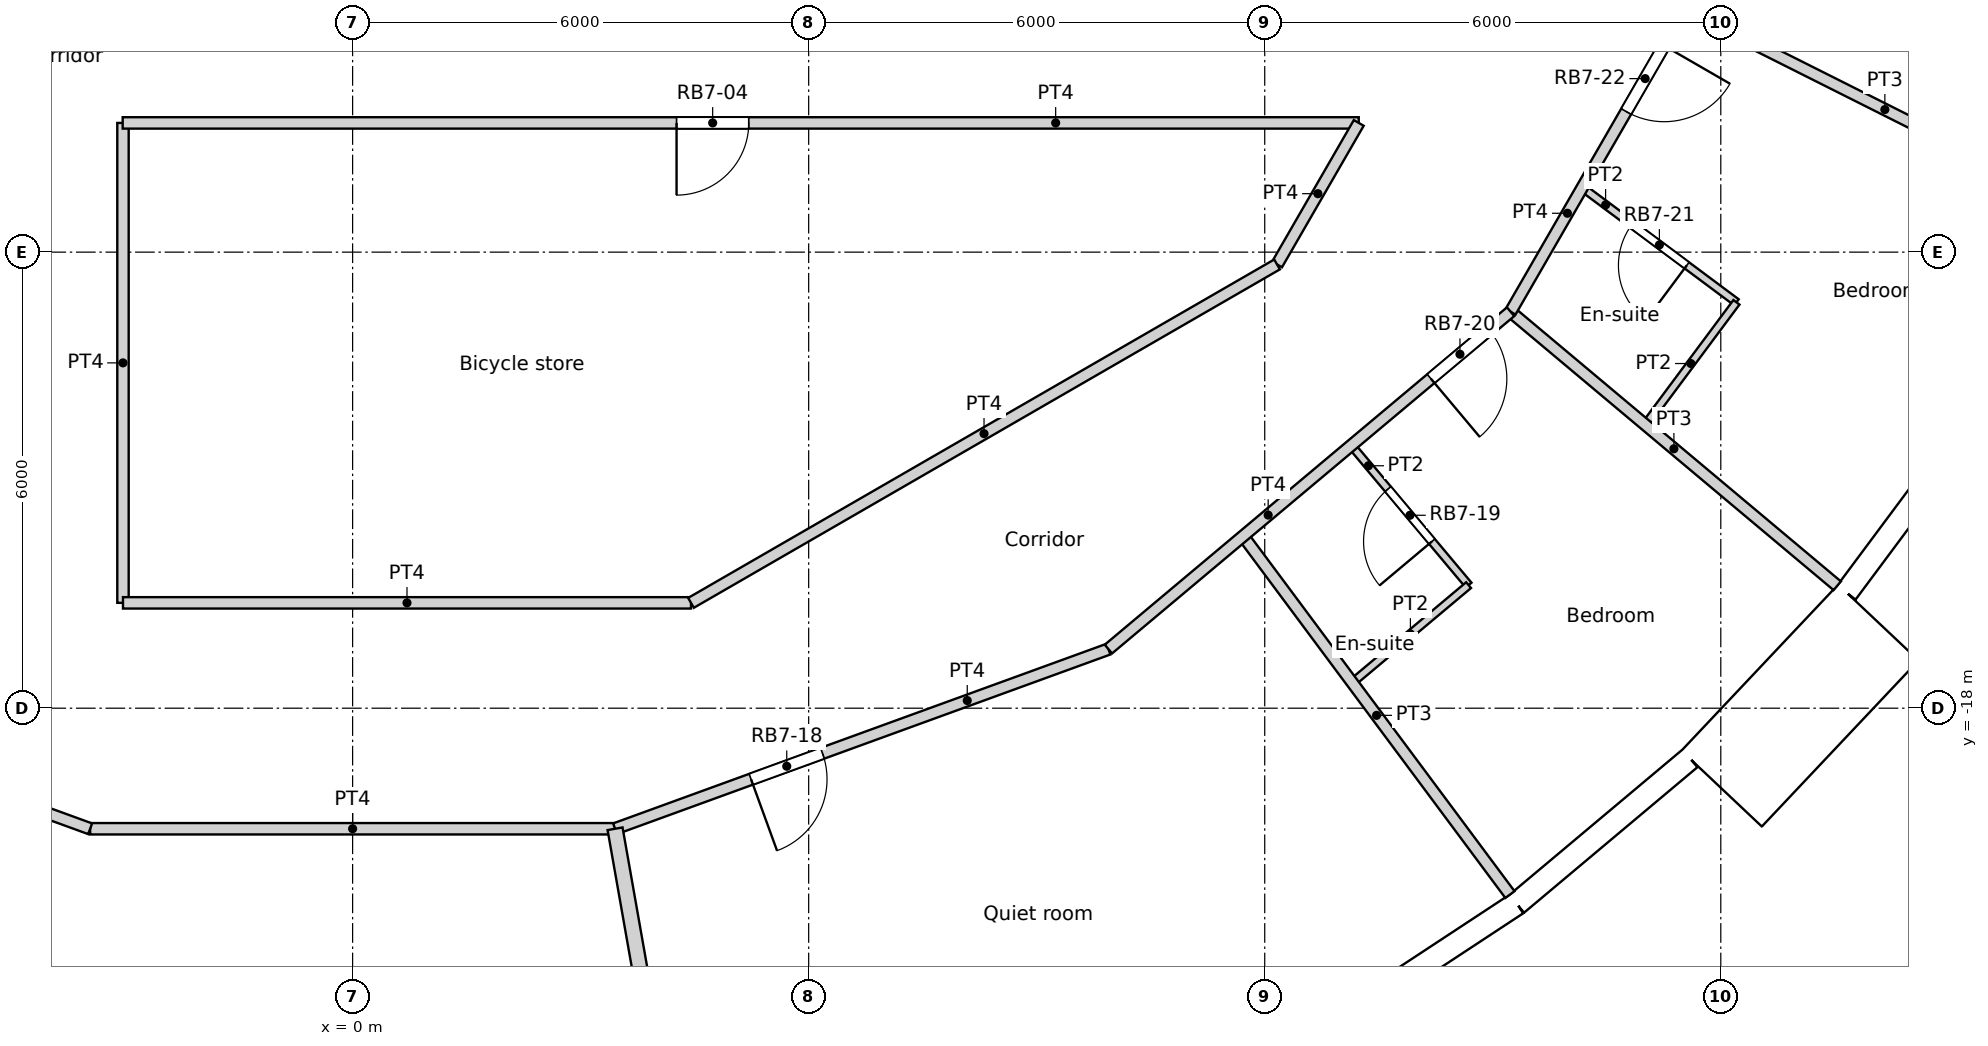
"""IFC4 building model, lengths in metres.
Left out: names, types, materials, properties, quantities, classifications, styles, units other than length and angle.
Written with IfcOpenShell. Run it as: python <this file> out.ifc"""

import sys

from ifc_helpers import new_model, si_unit, direction, frame, frame_2d, origin, origin_2d, place, context, subcontext, project, spatial, rectangle, circle, extrude, element, fill, save


model = new_model("IFC4")
c1 = context("Model", 3, precision=1e-05, world=origin(), true_north=direction((0.0, 1.0)))
c2 = subcontext(c1, "Body", "Model", "MODEL_VIEW")
j1 = project(units=[si_unit("LENGTHUNIT", "METRE"), si_unit("PLANEANGLEUNIT", "RADIAN")], contexts=[c1])
p1 = place(None, origin())
s1 = spatial("IfcSite", under=j1, at=p1, CompositionType="ELEMENT")
p2 = place(p1, origin())
s2 = spatial("IfcBuilding", under=s1, at=p2, CompositionType="ELEMENT")
p3 = place(p2, frame((0.0, 0.0, 190.8)))
s3 = spatial("IfcBuildingStorey", under=s2, at=p3, CompositionType="ELEMENT", Elevation=190.8)
for number, where, z_axis, x_axis in (
    (1, (14.659, -19.69, 0.0), (0.0, 0.0, 1.0), (1.0, 0.0, 0.0)),
    (2, (18.805, -15.779, 0.0), (0.0, 0.0, 1.0), (1.0, 0.0, 0.0)),
):
    element("IfcColumn", number, at=place(p3, frame(where, z_axis=z_axis, x_axis=x_axis)), inside=s3, PredefinedType="COLUMN", context=c2, shape_type="SweptSolid", body=[
        extrude(circle(Radius=0.6, at=origin_2d()), origin(), (0.0, 0.0, 1.0), 3.6),
    ])
for number, where, z_axis, x_axis in (
    (3, (-4.188, -18.35, 0.0), (0.0, 0.0, 1.0), (1.0, 0.0, 0.0)),
    (4, (1.406, -18.77, 0.0), (0.0, 0.0, 1.0), (1.0, 0.0, 0.0)),
    (5, (6.876, -17.521, 0.0), (0.0, 0.0, 1.0), (1.0, 0.0, 0.0)),
    (6, (11.735, -14.716, 0.0), (0.0, 0.0, 1.0), (1.0, 0.0, 0.0)),
    (7, (15.552, -10.603, 0.0), (0.0, 0.0, 1.0), (1.0, 0.0, 0.0)),
):
    element("IfcColumn", number, at=place(p3, frame(where, z_axis=z_axis, x_axis=x_axis)), inside=s3, PredefinedType="COLUMN", context=c2, shape_type="SweptSolid", body=[
        extrude(circle(Radius=0.65, at=origin_2d()), origin(), (0.0, 0.0, 1.0), 3.6),
    ])
p4 = place(p3, frame((12.832, -22.206, 0.0), z_axis=(0.0, 0.0, 1.0), x_axis=(0.835508361394, 0.54947773207, 0.0)))
e8 = element("IfcWall", 8, at=p4, inside=s3, PredefinedType="SOLIDWALL", context=c2, shape_type="SweptSolid", body=[
    extrude(rectangle(XDim=2.973, YDim=0.3, at=frame_2d((1.486, 0.0))), origin(), (0.0, 0.0, 1.0), 2.8),
])
p5 = place(p4, frame((1.486, 0.0, 1.55)))
e9 = element("IfcOpeningElement", 9, at=p5, cuts=e8, PredefinedType="OPENING", context=c2, shape_type="SweptSolid", body=[
    extrude(circle(Radius=0.9, at=origin_2d()), frame((0.0, 0.16, 0.0), z_axis=(0.0, -1.0, 0.0), x_axis=(1.0, 0.0, 0.0)), (0.0, 0.0, 1.0), 0.32),
])
p6 = place(p3, frame((15.316, -20.573, 0.0), z_axis=(0.0, 0.0, 1.0), x_axis=(0.766008913364, 0.642829950023, 0.0)))
e10 = element("IfcWall", 10, at=p6, inside=s3, PredefinedType="SOLIDWALL", context=c2, shape_type="SweptSolid", body=[
    extrude(rectangle(XDim=2.973, YDim=0.3, at=frame_2d((1.486, 0.0))), origin(), (0.0, 0.0, 1.0), 3.3),
])
p7 = place(p6, frame((1.486, 0.0, 1.55)))
e11 = element("IfcOpeningElement", 11, at=p7, cuts=e10, PredefinedType="OPENING", context=c2, shape_type="SweptSolid", body=[
    extrude(circle(Radius=0.9, at=origin_2d()), frame((0.0, 0.16, 0.0), z_axis=(0.0, -1.0, 0.0), x_axis=(1.0, 0.0, 0.0)), (0.0, 0.0, 1.0), 0.32),
])
p8 = place(p3, frame((18.013, -19.056, -0.3), z_axis=(0.0, 0.0, 1.0), x_axis=(0.686217177108, 0.727396718334, 0.0)))
e12 = element("IfcWall", 12, at=p8, inside=s3, PredefinedType="ELEMENTEDWALL", context=c2, shape_type="SweptSolid", body=[
    extrude(rectangle(XDim=3.0, YDim=1.45, at=frame_2d((1.5, 0.0))), origin(), (0.0, 0.0, 1.0), 3.6),
])
p9 = place(p8, frame((1.5, 0.0, 1.85)))
e13 = element("IfcOpeningElement", 13, at=p9, cuts=e12, PredefinedType="OPENING", context=c2, shape_type="SweptSolid", body=[
    extrude(circle(Radius=0.9, at=origin_2d()), frame((0.0, 0.735, 0.0), z_axis=(0.0, -1.0, 0.0), x_axis=(1.0, 0.0, 0.0)), (0.0, 0.0, 1.0), 1.47),
])
p10 = place(p3, frame((19.653, -16.478, 0.0), z_axis=(0.0, 0.0, 1.0), x_axis=(0.597197580538, 0.80209416517, 0.0)))
e14 = element("IfcWall", 14, at=p10, inside=s3, PredefinedType="SOLIDWALL", context=c2, shape_type="SweptSolid", body=[
    extrude(rectangle(XDim=2.973, YDim=0.3, at=frame_2d((1.486, 0.0))), origin(), (0.0, 0.0, 1.0), 2.8),
])
p11 = place(p10, frame((1.486, 0.0, 1.55)))
e15 = element("IfcOpeningElement", 15, at=p11, cuts=e14, PredefinedType="OPENING", context=c2, shape_type="SweptSolid", body=[
    extrude(circle(Radius=0.9, at=origin_2d()), frame((0.0, 0.16, 0.0), z_axis=(0.0, -1.0, 0.0), x_axis=(1.0, 0.0, 0.0)), (0.0, 0.0, 1.0), 0.32),
])
p12 = place(p3, frame((-3.025, -10.3, 0.0), z_axis=(0.0, 0.0, 1.0), x_axis=(1.0, 0.0, 0.0)))
e16 = element("IfcWall", 16, at=p12, inside=s3, PredefinedType="PARTITIONING", context=c2, shape_type="SweptSolid", body=[
    extrude(rectangle(XDim=16.262, YDim=0.15, at=frame_2d((8.131, 0.0))), origin(), (0.0, 0.0, 1.0), 3.3),
])
p13 = place(p12, frame((7.287, 0.0, 0.0)))
e17 = element("IfcOpeningElement", 17, at=p13, cuts=e16, PredefinedType="OPENING", context=c2, shape_type="SweptSolid", body=[
    extrude(rectangle(XDim=0.95, YDim=2.1, at=frame_2d((0.475, 1.05))), frame((0.0, 0.075, 0.0), z_axis=(0.0, -1.0, 0.0), x_axis=(1.0, 0.0, 0.0)), (0.0, 0.0, 1.0), 0.15),
])
p14 = place(p3, frame((12.162, -12.162, 0.0), z_axis=(0.0, 0.0, 1.0), x_axis=(0.499961633463, 0.866047553582, 0.0)))
e18 = element("IfcWall", 18, at=p14, inside=s3, PredefinedType="PARTITIONING", context=c2, shape_type="SweptSolid", body=[
    extrude(rectangle(XDim=2.15, YDim=0.15, at=frame_2d((1.075, 0.0))), origin(), (0.0, 0.0, 1.0), 3.3),
])
p15 = place(p3, frame((9.943, -17.222, 0.0), z_axis=(0.0, 0.0, 1.0), x_axis=(0.766192104565, 0.642611592567, 0.0)))
e19 = element("IfcWall", 19, at=p15, inside=s3, PredefinedType="PARTITIONING", context=c2, shape_type="SweptSolid", body=[
    extrude(rectangle(XDim=6.906, YDim=0.15, at=frame_2d((3.453, 0.0))), origin(), (0.0, 0.0, 1.0), 3.3),
])
p16 = place(p15, frame((5.537, 0.0, 0.0)))
e20 = element("IfcOpeningElement", 20, at=p16, cuts=e19, PredefinedType="OPENING", context=c2, shape_type="SweptSolid", body=[
    extrude(rectangle(XDim=1.0, YDim=2.1, at=frame_2d((0.5, 1.05))), frame((0.0, 0.075, 0.0), z_axis=(0.0, -1.0, 0.0), x_axis=(1.0, 0.0, 0.0)), (0.0, 0.0, 1.0), 0.15),
])
p17 = place(p3, frame((15.235, -12.784, 0.0), z_axis=(0.0, 0.0, 1.0), x_axis=(0.499982531118, 0.866035489213, 0.0)))
e21 = element("IfcWall", 21, at=p17, inside=s3, PredefinedType="PARTITIONING", context=c2, shape_type="SweptSolid", body=[
    extrude(rectangle(XDim=6.907, YDim=0.15, at=frame_2d((3.454, 0.0))), origin(), (0.0, 0.0, 1.0), 3.3),
])
p18 = place(p17, frame((3.041, 0.0, 0.0)))
e22 = element("IfcOpeningElement", 22, at=p18, cuts=e21, PredefinedType="OPENING", context=c2, shape_type="SweptSolid", body=[
    extrude(rectangle(XDim=1.0, YDim=2.1, at=frame_2d((0.5, 1.05))), frame((0.0, 0.075, 0.0), z_axis=(0.0, -1.0, 0.0), x_axis=(1.0, 0.0, 0.0)), (0.0, 0.0, 1.0), 0.15),
])
p19 = place(p17, frame((5.249, 0.0, 0.0)))
e23 = element("IfcOpeningElement", 23, at=p19, cuts=e21, PredefinedType="OPENING", context=c2, shape_type="SweptSolid", body=[
    extrude(rectangle(XDim=1.0, YDim=2.1, at=frame_2d((0.5, 1.05))), frame((0.0, 0.075, 0.0), z_axis=(0.0, -1.0, 0.0), x_axis=(1.0, 0.0, 0.0)), (0.0, 0.0, 1.0), 0.15),
])
p20 = place(p3, frame((-3.021, -16.614, 0.0), z_axis=(0.0, 0.0, 1.0), x_axis=(0.0, 1.0, 0.0)))
e24 = element("IfcWall", 24, at=p20, inside=s3, PredefinedType="PARTITIONING", context=c2, shape_type="SweptSolid", body=[
    extrude(rectangle(XDim=6.314, YDim=0.15, at=frame_2d((3.157, 0.0))), origin(), (0.0, 0.0, 1.0), 3.3),
])
p21 = place(p3, frame((-3.021, -16.614, 0.0), z_axis=(0.0, 0.0, 1.0), x_axis=(1.0, 0.0, 0.0)))
e25 = element("IfcWall", 25, at=p21, inside=s3, PredefinedType="PARTITIONING", context=c2, shape_type="SweptSolid", body=[
    extrude(rectangle(XDim=7.473, YDim=0.15, at=frame_2d((3.736, 0.0))), origin(), (0.0, 0.0, 1.0), 3.3),
])
p22 = place(p3, frame((4.452, -16.614, 0.0), z_axis=(0.0, 0.0, 1.0), x_axis=(0.866005203721, 0.500034985904, 0.0)))
e26 = element("IfcWall", 26, at=p22, inside=s3, PredefinedType="PARTITIONING", context=c2, shape_type="SweptSolid", body=[
    extrude(rectangle(XDim=8.903, YDim=0.15, at=frame_2d((4.452, 0.0))), origin(), (0.0, 0.0, 1.0), 3.3),
])
p23 = place(p3, frame((-3.453, -19.586, 0.0), z_axis=(0.0, 0.0, 1.0), x_axis=(1.0, 0.0, 0.0)))
e27 = element("IfcWall", 27, at=p23, inside=s3, PredefinedType="PARTITIONING", context=c2, shape_type="SweptSolid", body=[
    extrude(rectangle(XDim=6.906, YDim=0.15, at=frame_2d((3.453, 0.0))), origin(), (0.0, 0.0, 1.0), 3.3),
])
p24 = place(p3, frame((-9.944, -17.223, 0.0), z_axis=(0.0, 0.0, 1.0), x_axis=(0.939672634566, -0.342075050021, 0.0)))
e28 = element("IfcWall", 28, at=p24, inside=s3, PredefinedType="PARTITIONING", context=c2, shape_type="SweptSolid", body=[
    extrude(rectangle(XDim=6.908, YDim=0.15, at=frame_2d((3.454, 0.0))), origin(), (0.0, 0.0, 1.0), 3.3),
])
p25 = place(p24, frame((2.704, 0.0, 0.0)))
e29 = element("IfcOpeningElement", 29, at=p25, cuts=e28, PredefinedType="OPENING", context=c2, shape_type="SweptSolid", body=[
    extrude(rectangle(XDim=1.5, YDim=2.1, at=frame_2d((0.75, 1.05))), frame((0.0, 0.075, 0.0), z_axis=(0.0, -1.0, 0.0), x_axis=(1.0, 0.0, 0.0)), (0.0, 0.0, 1.0), 0.15),
])
p26 = place(p3, frame((3.453, -19.586, 0.0), z_axis=(0.0, 0.0, 1.0), x_axis=(0.939672634566, 0.342075050021, 0.0)))
e30 = element("IfcWall", 30, at=p26, inside=s3, PredefinedType="PARTITIONING", context=c2, shape_type="SweptSolid", body=[
    extrude(rectangle(XDim=6.908, YDim=0.15, at=frame_2d((3.454, 0.0))), origin(), (0.0, 0.0, 1.0), 3.3),
])
p27 = place(p26, frame((1.904, 0.0, 0.0)))
e31 = element("IfcOpeningElement", 31, at=p27, cuts=e30, PredefinedType="OPENING", context=c2, shape_type="SweptSolid", body=[
    extrude(rectangle(XDim=1.0, YDim=2.04, at=frame_2d((0.5, 1.02))), frame((0.0, 0.075, 0.0), z_axis=(0.0, -1.0, 0.0), x_axis=(1.0, 0.0, 0.0)), (0.0, 0.0, 1.0), 0.15),
])
p28 = place(p3, frame((3.453, -19.586, 0.0), z_axis=(0.0, 0.0, 1.0), x_axis=(0.17382754149, -0.984776109489, 0.0)))
e32 = element("IfcWall", 32, at=p28, inside=s3, PredefinedType="PARTITIONING", context=c2, shape_type="SweptSolid", body=[
    extrude(rectangle(XDim=5.61, YDim=0.2, at=frame_2d((2.805, 0.0))), origin(), (0.0, 0.0, 1.0), 3.3),
])
p29 = place(p3, frame((11.717, -15.736, 0.0), z_axis=(0.0, 0.0, 1.0), x_axis=(0.597012012598, -0.802232296043, 0.0)))
e33 = element("IfcWall", 33, at=p29, inside=s3, PredefinedType="PARTITIONING", context=c2, shape_type="SweptSolid", body=[
    extrude(rectangle(XDim=5.878, YDim=0.15, at=frame_2d((2.939, 0.0))), origin(), (0.0, 0.0, 1.0), 3.3),
])
p30 = place(p3, frame((13.151, -17.665, 0.0), z_axis=(0.0, 0.0, 1.0), x_axis=(0.766224532916, 0.642572925945, 0.0)))
e34 = element("IfcWall", 34, at=p30, inside=s3, PredefinedType="PARTITIONING", context=c2, shape_type="SweptSolid", body=[
    extrude(rectangle(XDim=1.998, YDim=0.1, at=frame_2d((0.999, 0.0))), origin(), (0.0, 0.0, 1.0), 3.3),
])
p31 = place(p3, frame((13.139, -14.542, 0.0), z_axis=(0.0, 0.0, 1.0), x_axis=(0.642731657745, -0.766091388891, 0.0)))
e35 = element("IfcWall", 35, at=p31, inside=s3, PredefinedType="PARTITIONING", context=c2, shape_type="SweptSolid", body=[
    extrude(rectangle(XDim=2.401, YDim=0.1, at=frame_2d((1.2, 0.0))), origin(), (0.0, 0.0, 1.0), 3.3),
])
p32 = place(p31, frame((0.75, 0.0, 0.0)))
e36 = element("IfcOpeningElement", 36, at=p32, cuts=e35, PredefinedType="OPENING", context=c2, shape_type="SweptSolid", body=[
    extrude(rectangle(XDim=0.9, YDim=2.04, at=frame_2d((0.45, 1.02))), frame((0.0, 0.05, 0.0), z_axis=(0.0, -1.0, 0.0), x_axis=(1.0, 0.0, 0.0)), (0.0, 0.0, 1.0), 0.1),
])
p33 = place(p3, frame((15.234, -12.785, 0.0), z_axis=(0.0, 0.0, 1.0), x_axis=(0.766230257274, -0.642566099976, 0.0)))
e37 = element("IfcWall", 37, at=p33, inside=s3, PredefinedType="PARTITIONING", context=c2, shape_type="SweptSolid", body=[
    extrude(rectangle(XDim=5.609, YDim=0.15, at=frame_2d((2.804, 0.0))), origin(), (0.0, 0.0, 1.0), 3.3),
])
p34 = place(p3, frame((17.007, -14.271, 0.0), z_axis=(0.0, 0.0, 1.0), x_axis=(0.597019866774, 0.802226450996, 0.0)))
e38 = element("IfcWall", 38, at=p34, inside=s3, PredefinedType="PARTITIONING", context=c2, shape_type="SweptSolid", body=[
    extrude(rectangle(XDim=2.008, YDim=0.1, at=frame_2d((1.004, 0.0))), origin(), (0.0, 0.0, 1.0), 3.3),
])
p35 = place(p3, frame((16.178, -11.15, 0.0), z_axis=(0.0, 0.0, 1.0), x_axis=(0.8020923136, -0.597200067367, 0.0)))
e39 = element("IfcWall", 39, at=p35, inside=s3, PredefinedType="PARTITIONING", context=c2, shape_type="SweptSolid", body=[
    extrude(rectangle(XDim=2.529, YDim=0.1, at=frame_2d((1.264, 0.0))), origin(), (0.0, 0.0, 1.0), 3.3),
])
p36 = place(p35, frame((0.814, 0.0, 0.0)))
e40 = element("IfcOpeningElement", 40, at=p36, cuts=e39, PredefinedType="OPENING", context=c2, shape_type="SweptSolid", body=[
    extrude(rectangle(XDim=0.9, YDim=2.04, at=frame_2d((0.45, 1.02))), frame((0.0, 0.05, 0.0), z_axis=(0.0, -1.0, 0.0), x_axis=(1.0, 0.0, 0.0)), (0.0, 0.0, 1.0), 0.1),
])
p37 = place(p3, frame((17.532, -8.805, 0.0), z_axis=(0.0, 0.0, 1.0), x_axis=(0.893628331628, -0.448807759415, 0.0)))
e41 = element("IfcWall", 41, at=p37, inside=s3, PredefinedType="PARTITIONING", context=c2, shape_type="SweptSolid", body=[
    extrude(rectangle(XDim=5.878, YDim=0.15, at=frame_2d((2.939, 0.0))), origin(), (0.0, 0.0, 1.0), 3.3),
])
p38 = place(p5, origin())
e42 = element("IfcWindow", 42, at=p38, inside=s3, PartitioningType="SINGLE_PANEL", PredefinedType="WINDOW", context=c2, shape_type="SweptSolid", body=[
    extrude(circle(Radius=0.9, at=origin_2d()), frame((0.0, 0.12, 0.0), z_axis=(0.0, -1.0, 0.0), x_axis=(1.0, 0.0, 0.0)), (0.0, 0.0, 1.0), 0.1),
])
fill(e9, e42)
p39 = place(p7, origin())
e43 = element("IfcWindow", 43, at=p39, inside=s3, PartitioningType="SINGLE_PANEL", PredefinedType="WINDOW", context=c2, shape_type="SweptSolid", body=[
    extrude(circle(Radius=0.9, at=origin_2d()), frame((0.0, 0.12, 0.0), z_axis=(0.0, -1.0, 0.0), x_axis=(1.0, 0.0, 0.0)), (0.0, 0.0, 1.0), 0.1),
])
fill(e11, e43)
p40 = place(p9, origin())
e44 = element("IfcWindow", 44, at=p40, inside=s3, PartitioningType="SINGLE_PANEL", PredefinedType="WINDOW", context=c2, shape_type="SweptSolid", body=[
    extrude(circle(Radius=0.9, at=origin_2d()), frame((0.0, 0.695, 0.0), z_axis=(0.0, -1.0, 0.0), x_axis=(1.0, 0.0, 0.0)), (0.0, 0.0, 1.0), 0.1),
])
fill(e13, e44)
p41 = place(p11, origin())
e45 = element("IfcWindow", 45, at=p41, inside=s3, PartitioningType="SINGLE_PANEL", PredefinedType="WINDOW", context=c2, shape_type="SweptSolid", body=[
    extrude(circle(Radius=0.9, at=origin_2d()), frame((0.0, 0.12, 0.0), z_axis=(0.0, -1.0, 0.0), x_axis=(1.0, 0.0, 0.0)), (0.0, 0.0, 1.0), 0.1),
])
fill(e15, e45)
p42 = place(p13, origin())
e46 = element("IfcDoor", 46, at=p42, inside=s3, OperationType="SINGLE_SWING_RIGHT", PredefinedType="DOOR", context=c2, shape_type="SweptSolid", body=[
    extrude(rectangle(XDim=0.95, YDim=2.1, at=frame_2d((0.475, 1.05))), frame((0.0, 0.025, 0.0), z_axis=(0.0, -1.0, 0.0), x_axis=(1.0, 0.0, 0.0)), (0.0, 0.0, 1.0), 0.05),
])
fill(e17, e46)
p43 = place(p27, origin())
e47 = element("IfcDoor", 47, at=p43, inside=s3, OperationType="SINGLE_SWING_RIGHT", PredefinedType="DOOR", context=c2, shape_type="SweptSolid", body=[
    extrude(rectangle(XDim=1.0, YDim=2.04, at=frame_2d((0.5, 1.02))), frame((0.0, 0.025, 0.0), z_axis=(0.0, -1.0, 0.0), x_axis=(1.0, 0.0, 0.0)), (0.0, 0.0, 1.0), 0.05),
])
fill(e31, e47)
p44 = place(p32, origin())
e48 = element("IfcDoor", 48, at=p44, inside=s3, OperationType="SINGLE_SWING_LEFT", PredefinedType="DOOR", context=c2, shape_type="SweptSolid", body=[
    extrude(rectangle(XDim=0.9, YDim=2.04, at=frame_2d((0.45, 1.02))), frame((0.0, 0.025, 0.0), z_axis=(0.0, -1.0, 0.0), x_axis=(1.0, 0.0, 0.0)), (0.0, 0.0, 1.0), 0.05),
])
fill(e36, e48)
p45 = place(p16, origin())
e49 = element("IfcDoor", 49, at=p45, inside=s3, OperationType="SINGLE_SWING_RIGHT", PredefinedType="DOOR", context=c2, shape_type="SweptSolid", body=[
    extrude(rectangle(XDim=1.0, YDim=2.1, at=frame_2d((0.5, 1.05))), frame((0.0, 0.025, 0.0), z_axis=(0.0, -1.0, 0.0), x_axis=(1.0, 0.0, 0.0)), (0.0, 0.0, 1.0), 0.05),
])
fill(e20, e49)
p46 = place(p36, origin())
e50 = element("IfcDoor", 50, at=p46, inside=s3, OperationType="SINGLE_SWING_LEFT", PredefinedType="DOOR", context=c2, shape_type="SweptSolid", body=[
    extrude(rectangle(XDim=0.9, YDim=2.04, at=frame_2d((0.45, 1.02))), frame((0.0, 0.025, 0.0), z_axis=(0.0, -1.0, 0.0), x_axis=(1.0, 0.0, 0.0)), (0.0, 0.0, 1.0), 0.05),
])
fill(e40, e50)
p47 = place(p18, origin())
e51 = element("IfcDoor", 51, at=p47, inside=s3, OperationType="SINGLE_SWING_LEFT", PredefinedType="DOOR", context=c2, shape_type="SweptSolid", body=[
    extrude(rectangle(XDim=1.0, YDim=2.1, at=frame_2d((0.5, 1.05))), frame((0.0, 0.025, 0.0), z_axis=(0.0, -1.0, 0.0), x_axis=(1.0, 0.0, 0.0)), (0.0, 0.0, 1.0), 0.05),
])
fill(e22, e51)
save(model, sys.argv[1])
